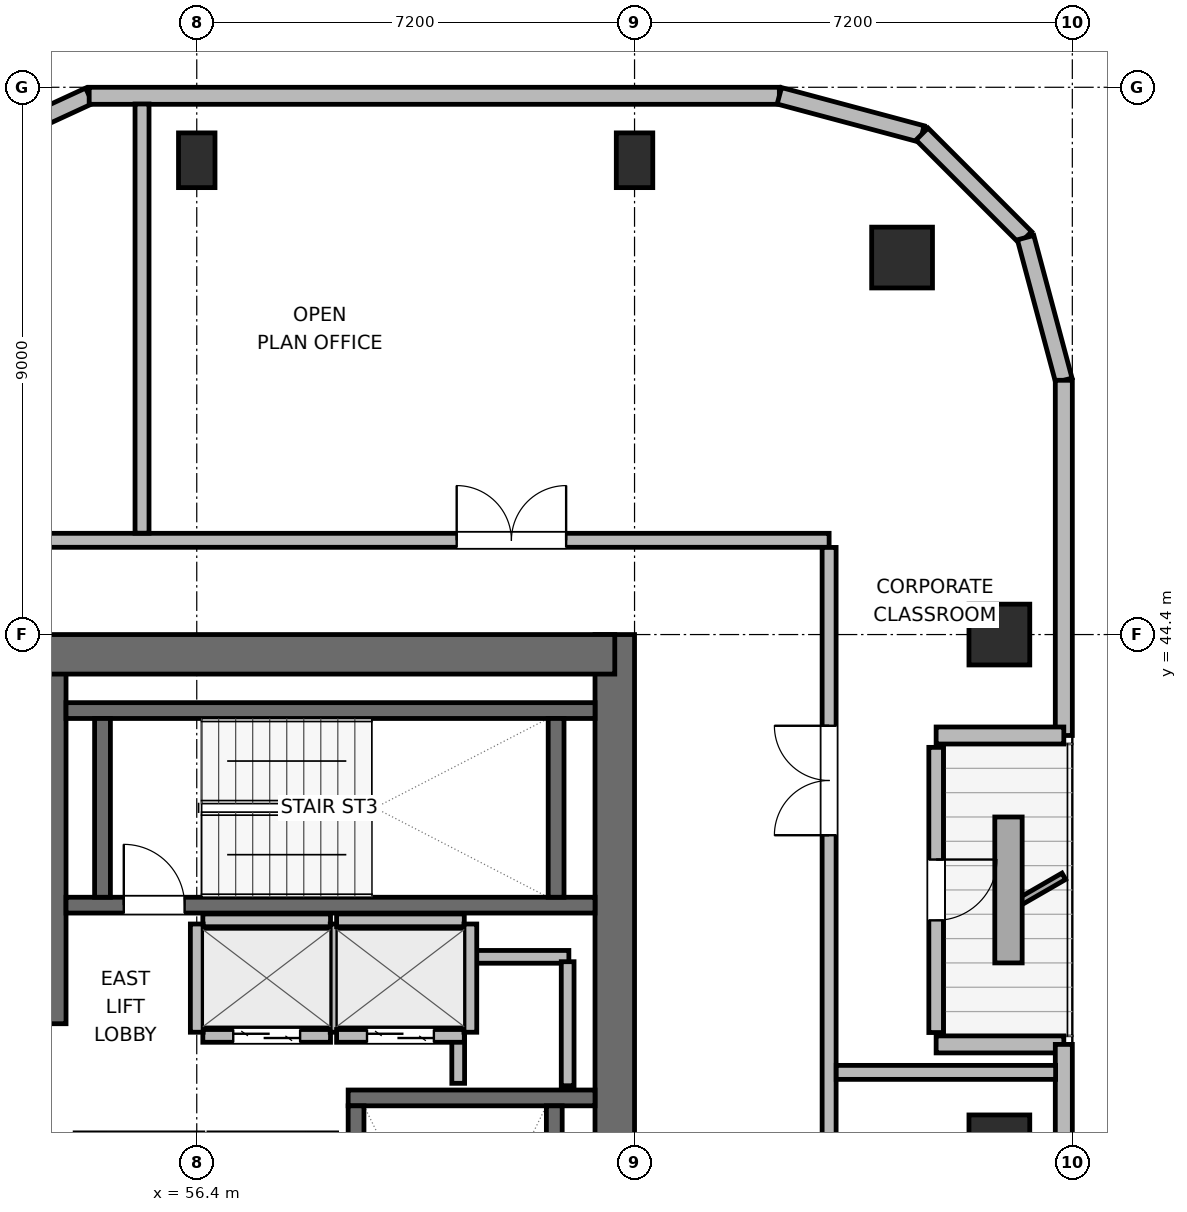
"""IFC4 building model, lengths in metres.
Left out: names, types, materials, properties, quantities, classifications, styles, units other than length and angle.
Written with IfcOpenShell. Run it as: python <this file> out.ifc"""

import sys

from ifc_helpers import new_model, si_unit, direction, frame, frame_2d, origin, origin_2d, place, context, subcontext, project, spatial, rectangle, circle, extrude, element, fill, save


model = new_model("IFC4")
c1 = context("Model", 3, precision=1e-05, world=origin(), true_north=direction((0.0, 1.0)))
c2 = subcontext(c1, "Body", "Model", "MODEL_VIEW")
j1 = project(units=[si_unit("LENGTHUNIT", "METRE"), si_unit("PLANEANGLEUNIT", "RADIAN")], contexts=[c1])
p1 = place(None, origin())
s1 = spatial("IfcSite", under=j1, at=p1, CompositionType="ELEMENT")
p2 = place(p1, origin())
s2 = spatial("IfcBuilding", under=s1, at=p2, CompositionType="ELEMENT")
p3 = place(p2, frame((0.0, 0.0, 255.0)))
s3 = spatial("IfcBuildingStorey", under=s2, at=p3, CompositionType="ELEMENT", Elevation=255.0)
p4 = place(p3, frame((53.925, 38.0, 0.0), z_axis=(0.0, 0.0, 1.0), x_axis=(0.0, 1.0, 0.0)))
e1 = element("IfcWall", 1, at=p4, inside=s3, PredefinedType="SHEAR", context=c2, shape_type="SweptSolid", body=[
    extrude(rectangle(XDim=6.075, YDim=0.65, at=frame_2d((3.038, 0.0))), origin(), (0.0, 0.0, 1.0), 3.9),
])
p5 = place(p3, frame((63.275, 27.6, 0.0), z_axis=(0.0, 0.0, 1.0), x_axis=(0.0, 1.0, 0.0)))
e2 = element("IfcWall", 2, at=p5, inside=s3, PredefinedType="SHEAR", context=c2, shape_type="SweptSolid", body=[
    extrude(rectangle(XDim=16.8, YDim=0.65, at=frame_2d((8.4, 0.0))), origin(), (0.0, 0.0, 1.0), 3.9),
])
p6 = place(p3, frame((53.925, 44.075, 0.0), z_axis=(0.0, 0.0, 1.0), x_axis=(1.0, 0.0, 0.0)))
e3 = element("IfcWall", 3, at=p6, inside=s3, PredefinedType="SHEAR", context=c2, shape_type="SweptSolid", body=[
    extrude(rectangle(XDim=9.35, YDim=0.65, at=frame_2d((4.675, 0.0))), origin(), (0.0, 0.0, 1.0), 3.9),
])
p7 = place(p3, frame((58.89, 36.78, 0.0), z_axis=(0.0, 0.0, 1.0), x_axis=(1.0, 0.0, 0.0)))
e4 = element("IfcWall", 4, at=p7, inside=s3, PredefinedType="SHEAR", context=c2, shape_type="SweptSolid", body=[
    extrude(rectangle(XDim=4.06, YDim=0.26, at=frame_2d((2.03, 0.0))), origin(), (0.0, 0.0, 1.0), 3.9),
])
p8 = place(p3, frame((59.02, 29.05, 0.0), z_axis=(0.0, 0.0, 1.0), x_axis=(0.0, 1.0, 0.0)))
e5 = element("IfcWall", 5, at=p8, inside=s3, PredefinedType="SHEAR", context=c2, shape_type="SweptSolid", body=[
    extrude(rectangle(XDim=7.6, YDim=0.26, at=frame_2d((3.8, 0.0))), origin(), (0.0, 0.0, 1.0), 3.9),
])
p9 = place(p8, frame((0.3, 0.0, 0.0)))
e6 = element("IfcOpeningElement", 6, at=p9, cuts=e5, PredefinedType="OPENING", context=c2, shape_type="SweptSolid", body=[
    extrude(rectangle(XDim=1.0, YDim=2.04, at=frame_2d((0.5, 1.02))), frame((0.0, 0.14, 0.0), z_axis=(0.0, -1.0, 0.0), x_axis=(1.0, 0.0, 0.0)), (0.0, 0.0, 1.0), 0.28),
])
p10 = place(p3, frame((62.28, 29.05, 0.0), z_axis=(0.0, 0.0, 1.0), x_axis=(0.0, 1.0, 0.0)))
e7 = element("IfcWall", 7, at=p10, inside=s3, PredefinedType="SHEAR", context=c2, shape_type="SweptSolid", body=[
    extrude(rectangle(XDim=7.6, YDim=0.26, at=frame_2d((3.8, 0.0))), origin(), (0.0, 0.0, 1.0), 3.9),
])
p11 = place(p3, frame((54.25, 39.95, 0.0), z_axis=(0.0, 0.0, 1.0), x_axis=(1.0, 0.0, 0.0)))
e8 = element("IfcWall", 8, at=p11, inside=s3, PredefinedType="SHEAR", context=c2, shape_type="SweptSolid", body=[
    extrude(rectangle(XDim=8.7, YDim=0.26, at=frame_2d((4.35, 0.0))), origin(), (0.0, 0.0, 1.0), 3.9),
])
p12 = place(p11, frame((0.95, 0.0, 0.0)))
e9 = element("IfcOpeningElement", 9, at=p12, cuts=e8, PredefinedType="OPENING", context=c2, shape_type="SweptSolid", body=[
    extrude(rectangle(XDim=1.0, YDim=2.04, at=frame_2d((0.5, 1.02))), frame((0.0, 0.14, 0.0), z_axis=(0.0, -1.0, 0.0), x_axis=(1.0, 0.0, 0.0)), (0.0, 0.0, 1.0), 0.28),
])
p13 = place(p3, frame((54.25, 43.15, 0.0), z_axis=(0.0, 0.0, 1.0), x_axis=(1.0, 0.0, 0.0)))
e10 = element("IfcWall", 10, at=p13, inside=s3, PredefinedType="SHEAR", context=c2, shape_type="SweptSolid", body=[
    extrude(rectangle(XDim=8.7, YDim=0.26, at=frame_2d((4.35, 0.0))), origin(), (0.0, 0.0, 1.0), 3.9),
])
for number, where, z_axis, x_axis in (
    (11, (54.85, 40.08, 0.0), (0.0, 0.0, 1.0), (0.0, 1.0, 0.0)),
    (12, (62.31, 40.08, 0.0), (0.0, 0.0, 1.0), (0.0, 1.0, 0.0)),
):
    element("IfcWall", number, at=place(p3, frame(where, z_axis=z_axis, x_axis=x_axis)), inside=s3, PredefinedType="SHEAR", context=c2, shape_type="SweptSolid", body=[
        extrude(rectangle(XDim=2.94, YDim=0.26, at=frame_2d((1.47, 0.0))), origin(), (0.0, 0.0, 1.0), 3.9),
    ])
p14 = place(p3, frame((68.0, 50.6, 0.0), z_axis=(0.0, 0.0, 1.0), x_axis=(1.0, 0.0, 0.0)))
e13 = element("IfcColumn", 13, at=p14, inside=s3, PredefinedType="COLUMN", context=c2, shape_type="SweptSolid", body=[
    extrude(circle(Radius=0.5, at=origin_2d()), origin(), (0.0, 0.0, 1.0), 3.9),
])
for number, where, z_axis, x_axis in (
    (14, (56.4, 52.2, 0.0), (0.0, 0.0, 1.0), (1.0, 0.0, 0.0)),
    (15, (63.6, 52.2, 0.0), (0.0, 0.0, 1.0), (1.0, 0.0, 0.0)),
):
    element("IfcColumn", number, at=place(p3, frame(where, z_axis=z_axis, x_axis=x_axis)), inside=s3, PredefinedType="COLUMN", context=c2, shape_type="SweptSolid", body=[
        extrude(rectangle(XDim=0.6, YDim=0.9, at=origin_2d()), origin(), (0.0, 0.0, 1.0), 3.9),
    ])
for number, where, z_axis, x_axis in (
    (16, (69.6, 36.0, 0.0), (0.0, 0.0, 1.0), (1.0, 0.0, 0.0)),
    (17, (69.6, 44.4, 0.0), (0.0, 0.0, 1.0), (1.0, 0.0, 0.0)),
):
    element("IfcColumn", number, at=place(p3, frame(where, z_axis=z_axis, x_axis=x_axis)), inside=s3, PredefinedType="COLUMN", context=c2, shape_type="SweptSolid", body=[
        extrude(rectangle(XDim=1.0, YDim=1.0, at=origin_2d()), origin(), (0.0, 0.0, 1.0), 3.9),
    ])
p15 = place(p3, frame((53.54, 52.756, 0.0), z_axis=(0.0, 0.0, 1.0), x_axis=(0.907893953211, 0.419199916176, 0.0)))
e18 = element("IfcWall", 18, at=p15, inside=s3, PredefinedType="SOLIDWALL", context=c2, shape_type="SweptSolid", body=[
    extrude(rectangle(XDim=1.201, YDim=0.28, at=frame_2d((0.601, 0.0))), origin(), (0.0, 0.0, 1.0), 3.68),
])
p16 = place(p3, frame((54.631, 53.26, 0.0), z_axis=(0.0, 0.0, 1.0), x_axis=(1.0, 0.0, 0.0)))
e19 = element("IfcWall", 19, at=p16, inside=s3, PredefinedType="SOLIDWALL", context=c2, shape_type="SweptSolid", body=[
    extrude(rectangle(XDim=11.351, YDim=0.28, at=frame_2d((5.675, 0.0))), origin(), (0.0, 0.0, 1.0), 3.68),
])
p17 = place(p3, frame((65.982, 53.26, 0.0), z_axis=(0.0, 0.0, 1.0), x_axis=(0.965937282298, -0.25877628691, 0.0)))
e20 = element("IfcWall", 20, at=p17, inside=s3, PredefinedType="SOLIDWALL", context=c2, shape_type="SweptSolid", body=[
    extrude(rectangle(XDim=2.428, YDim=0.28, at=frame_2d((1.214, 0.0))), origin(), (0.0, 0.0, 1.0), 3.68),
])
p18 = place(p3, frame((68.327, 52.632, 0.0), z_axis=(0.0, 0.0, 1.0), x_axis=(0.707106781187, -0.707106781187, 0.0)))
e21 = element("IfcWall", 21, at=p18, inside=s3, PredefinedType="SOLIDWALL", context=c2, shape_type="SweptSolid", body=[
    extrude(rectangle(XDim=2.41, YDim=0.28, at=frame_2d((1.205, 0.0))), origin(), (0.0, 0.0, 1.0), 3.68),
])
p19 = place(p3, frame((70.031, 50.927, 0.0), z_axis=(0.0, 0.0, 1.0), x_axis=(0.258751159445, -0.965944013639, 0.0)))
e22 = element("IfcWall", 22, at=p19, inside=s3, PredefinedType="SOLIDWALL", context=c2, shape_type="SweptSolid", body=[
    extrude(rectangle(XDim=2.429, YDim=0.28, at=frame_2d((1.214, 0.0))), origin(), (0.0, 0.0, 1.0), 3.68),
])
p20 = place(p3, frame((70.66, 48.582, 0.0), z_axis=(0.0, 0.0, 1.0), x_axis=(0.0, -1.0, 0.0)))
e23 = element("IfcWall", 23, at=p20, inside=s3, PredefinedType="SOLIDWALL", context=c2, shape_type="SweptSolid", body=[
    extrude(rectangle(XDim=5.842, YDim=0.28, at=frame_2d((2.921, 0.0))), origin(), (0.0, 0.0, 1.0), 3.68),
])
p21 = place(p3, frame((70.66, 42.74, 0.0), z_axis=(0.0, 0.0, 1.0), x_axis=(-1.0, 0.0, 0.0)))
e24 = element("IfcWall", 24, at=p21, inside=s3, PredefinedType="SOLIDWALL", context=c2, shape_type="SweptSolid", body=[
    extrude(rectangle(XDim=2.1, YDim=0.28, at=frame_2d((1.05, 0.0))), origin(), (0.0, 0.0, 1.0), 3.126),
])
p22 = place(p3, frame((68.56, 42.545, 0.0), z_axis=(0.0, 0.0, 1.0), x_axis=(0.0, -1.0, 0.0)))
e25 = element("IfcWall", 25, at=p22, inside=s3, PredefinedType="SOLIDWALL", context=c2, shape_type="SweptSolid", body=[
    extrude(rectangle(XDim=4.69, YDim=0.24, at=frame_2d((2.345, 0.0))), origin(), (0.0, 0.0, 1.0), 3.311),
])
p23 = place(p22, frame((1.845, 0.0, 0.0)))
e26 = element("IfcOpeningElement", 26, at=p23, cuts=e25, PredefinedType="OPENING", context=c2, shape_type="SweptSolid", body=[
    extrude(rectangle(XDim=1.0, YDim=2.02, at=frame_2d((0.5, 1.01))), frame((0.0, 0.13, 0.0), z_axis=(0.0, -1.0, 0.0), x_axis=(1.0, 0.0, 0.0)), (0.0, 0.0, 1.0), 0.26),
])
p24 = place(p3, frame((68.56, 37.66, 0.0), z_axis=(0.0, 0.0, 1.0), x_axis=(1.0, 0.0, 0.0)))
e27 = element("IfcWall", 27, at=p24, inside=s3, PredefinedType="SOLIDWALL", context=c2, shape_type="SweptSolid", body=[
    extrude(rectangle(XDim=2.1, YDim=0.28, at=frame_2d((1.05, 0.0))), origin(), (0.0, 0.0, 1.0), 3.126),
])
p25 = place(p3, frame((70.66, 37.66, 0.0), z_axis=(0.0, 0.0, 1.0), x_axis=(0.0, -1.0, 0.0)))
e28 = element("IfcWall", 28, at=p25, inside=s3, PredefinedType="SOLIDWALL", context=c2, shape_type="SweptSolid", body=[
    extrude(rectangle(XDim=14.241, YDim=0.28, at=frame_2d((7.121, 0.0))), origin(), (0.0, 0.0, 1.0), 3.68),
])
p26 = place(p25, frame((6.456, 0.0, 0.85)))
e29 = element("IfcOpeningElement", 29, at=p26, cuts=e28, PredefinedType="OPENING", context=c2, shape_type="SweptSolid", body=[
    extrude(rectangle(XDim=1.6, YDim=1.0, at=frame_2d((0.8, 0.5))), frame((0.0, 0.15, 0.0), z_axis=(0.0, -1.0, 0.0), x_axis=(1.0, 0.0, 0.0)), (0.0, 0.0, 1.0), 0.3),
])
p27 = place(p3, frame((60.72, 39.1, 0.0), z_axis=(0.0, 0.0, 1.0), x_axis=(1.0, 0.0, 0.0)))
e30 = element("IfcWall", 30, at=p27, inside=s3, PredefinedType="PARTITIONING", context=c2, shape_type="SweptSolid", body=[
    extrude(rectangle(XDim=1.8, YDim=0.21, at=frame_2d((0.9, 0.0))), origin(), (0.0, 0.0, 1.0), 3.68),
])
p28 = place(p3, frame((60.7, 37.02, 0.0), z_axis=(0.0, 0.0, 1.0), x_axis=(0.0, 1.0, 0.0)))
e31 = element("IfcWall", 31, at=p28, inside=s3, PredefinedType="PARTITIONING", context=c2, shape_type="SweptSolid", body=[
    extrude(rectangle(XDim=1.96, YDim=0.21, at=frame_2d((0.98, 0.0))), origin(), (0.0, 0.0, 1.0), 3.68),
])
p29 = place(p3, frame((62.5, 36.98, 0.0), z_axis=(0.0, 0.0, 1.0), x_axis=(0.0, 1.0, 0.0)))
e32 = element("IfcWall", 32, at=p29, inside=s3, PredefinedType="PARTITIONING", context=c2, shape_type="SweptSolid", body=[
    extrude(rectangle(XDim=2.04, YDim=0.21, at=frame_2d((1.02, 0.0))), origin(), (0.0, 0.0, 1.0), 3.68),
])
p30 = place(p3, frame((56.5, 37.8, 0.0), z_axis=(0.0, 0.0, 1.0), x_axis=(1.0, 0.0, 0.0)))
e33 = element("IfcWall", 33, at=p30, inside=s3, PredefinedType="PARTITIONING", context=c2, shape_type="SweptSolid", body=[
    extrude(rectangle(XDim=2.1, YDim=0.21, at=frame_2d((1.05, 0.0))), origin(), (0.0, 0.0, 1.0), 3.68),
])
p31 = place(p30, frame((0.5, 0.0, 0.0)))
e34 = element("IfcOpeningElement", 34, at=p31, cuts=e33, PredefinedType="OPENING", context=c2, shape_type="SweptSolid", body=[
    extrude(rectangle(XDim=1.1, YDim=2.04, at=frame_2d((0.55, 1.02))), frame((0.0, 0.115, 0.0), z_axis=(0.0, -1.0, 0.0), x_axis=(1.0, 0.0, 0.0)), (0.0, 0.0, 1.0), 0.23),
])
p32 = place(p3, frame((56.5, 39.7, 0.0), z_axis=(0.0, 0.0, 1.0), x_axis=(1.0, 0.0, 0.0)))
e35 = element("IfcWall", 35, at=p32, inside=s3, PredefinedType="PARTITIONING", context=c2, shape_type="SweptSolid", body=[
    extrude(rectangle(XDim=2.1, YDim=0.21, at=frame_2d((1.05, 0.0))), origin(), (0.0, 0.0, 1.0), 3.68),
])
for number, where, z_axis, x_axis in (
    (36, (56.4, 37.86, 0.0), (0.0, 0.0, 1.0), (0.0, 1.0, 0.0)),
    (37, (58.7, 37.86, 0.0), (0.0, 0.0, 1.0), (0.0, 1.0, 0.0)),
):
    element("IfcWall", number, at=place(p3, frame(where, z_axis=z_axis, x_axis=x_axis)), inside=s3, PredefinedType="PARTITIONING", context=c2, shape_type="SweptSolid", body=[
        extrude(rectangle(XDim=1.78, YDim=0.21, at=frame_2d((0.89, 0.0))), origin(), (0.0, 0.0, 1.0), 3.68),
    ])
p33 = place(p3, frame((58.7, 37.8, 0.0), z_axis=(0.0, 0.0, 1.0), x_axis=(1.0, 0.0, 0.0)))
e38 = element("IfcWall", 38, at=p33, inside=s3, PredefinedType="PARTITIONING", context=c2, shape_type="SweptSolid", body=[
    extrude(rectangle(XDim=2.1, YDim=0.21, at=frame_2d((1.05, 0.0))), origin(), (0.0, 0.0, 1.0), 3.68),
])
p34 = place(p33, frame((0.5, 0.0, 0.0)))
e39 = element("IfcOpeningElement", 39, at=p34, cuts=e38, PredefinedType="OPENING", context=c2, shape_type="SweptSolid", body=[
    extrude(rectangle(XDim=1.1, YDim=2.04, at=frame_2d((0.55, 1.02))), frame((0.0, 0.115, 0.0), z_axis=(0.0, -1.0, 0.0), x_axis=(1.0, 0.0, 0.0)), (0.0, 0.0, 1.0), 0.23),
])
p35 = place(p3, frame((58.7, 39.7, 0.0), z_axis=(0.0, 0.0, 1.0), x_axis=(1.0, 0.0, 0.0)))
e40 = element("IfcWall", 40, at=p35, inside=s3, PredefinedType="PARTITIONING", context=c2, shape_type="SweptSolid", body=[
    extrude(rectangle(XDim=2.1, YDim=0.21, at=frame_2d((1.05, 0.0))), origin(), (0.0, 0.0, 1.0), 3.68),
])
p36 = place(p3, frame((60.9, 37.86, 0.0), z_axis=(0.0, 0.0, 1.0), x_axis=(0.0, 1.0, 0.0)))
e41 = element("IfcWall", 41, at=p36, inside=s3, PredefinedType="PARTITIONING", context=c2, shape_type="SweptSolid", body=[
    extrude(rectangle(XDim=1.78, YDim=0.21, at=frame_2d((0.89, 0.0))), origin(), (0.0, 0.0, 1.0), 3.68),
])
p37 = place(p3, frame((30.8, 45.95, 0.0), z_axis=(0.0, 0.0, 1.0), x_axis=(1.0, 0.0, 0.0)))
e42 = element("IfcWall", 42, at=p37, inside=s3, PredefinedType="PARTITIONING", context=c2, shape_type="SweptSolid", body=[
    extrude(rectangle(XDim=36.0, YDim=0.23, at=frame_2d((18.0, 0.0))), origin(), (0.0, 0.0, 1.0), 3.68),
])
p38 = place(p37, frame((3.875, 0.0, 0.0)))
e43 = element("IfcOpeningElement", 43, at=p38, cuts=e42, PredefinedType="OPENING", context=c2, shape_type="SweptSolid", body=[
    extrude(rectangle(XDim=1.8, YDim=2.06, at=frame_2d((0.9, 1.03))), frame((0.0, 0.125, 0.0), z_axis=(0.0, -1.0, 0.0), x_axis=(1.0, 0.0, 0.0)), (0.0, 0.0, 1.0), 0.25),
])
p39 = place(p37, frame((16.225, 0.0, 0.0)))
e44 = element("IfcOpeningElement", 44, at=p39, cuts=e42, PredefinedType="OPENING", context=c2, shape_type="SweptSolid", body=[
    extrude(rectangle(XDim=1.8, YDim=2.06, at=frame_2d((0.9, 1.03))), frame((0.0, 0.125, 0.0), z_axis=(0.0, -1.0, 0.0), x_axis=(1.0, 0.0, 0.0)), (0.0, 0.0, 1.0), 0.25),
])
p40 = place(p37, frame((29.875, 0.0, 0.0)))
e45 = element("IfcOpeningElement", 45, at=p40, cuts=e42, PredefinedType="OPENING", context=c2, shape_type="SweptSolid", body=[
    extrude(rectangle(XDim=1.8, YDim=2.06, at=frame_2d((0.9, 1.03))), frame((0.0, 0.125, 0.0), z_axis=(0.0, -1.0, 0.0), x_axis=(1.0, 0.0, 0.0)), (0.0, 0.0, 1.0), 0.25),
])
p41 = place(p3, frame((66.8, 26.167, 0.0), z_axis=(0.0, 0.0, 1.0), x_axis=(0.0, 1.0, 0.0)))
e46 = element("IfcWall", 46, at=p41, inside=s3, PredefinedType="PARTITIONING", context=c2, shape_type="SweptSolid", body=[
    extrude(rectangle(XDim=19.666, YDim=0.23, at=frame_2d((9.833, 0.0))), origin(), (0.0, 0.0, 1.0), 3.68),
])
p42 = place(p41, frame((4.983, 0.0, 0.0)))
e47 = element("IfcOpeningElement", 47, at=p42, cuts=e46, PredefinedType="OPENING", context=c2, shape_type="SweptSolid", body=[
    extrude(rectangle(XDim=1.8, YDim=2.06, at=frame_2d((0.9, 1.03))), frame((0.0, 0.125, 0.0), z_axis=(0.0, -1.0, 0.0), x_axis=(1.0, 0.0, 0.0)), (0.0, 0.0, 1.0), 0.25),
])
p43 = place(p41, frame((14.933, 0.0, 0.0)))
e48 = element("IfcOpeningElement", 48, at=p43, cuts=e46, PredefinedType="OPENING", context=c2, shape_type="SweptSolid", body=[
    extrude(rectangle(XDim=1.8, YDim=2.06, at=frame_2d((0.9, 1.03))), frame((0.0, 0.125, 0.0), z_axis=(0.0, -1.0, 0.0), x_axis=(1.0, 0.0, 0.0)), (0.0, 0.0, 1.0), 0.25),
])
p44 = place(p3, frame((55.5, 46.067, 0.0), z_axis=(0.0, 0.0, 1.0), x_axis=(0.0, 1.0, 0.0)))
e49 = element("IfcWall", 49, at=p44, inside=s3, PredefinedType="PARTITIONING", context=c2, shape_type="SweptSolid", body=[
    extrude(rectangle(XDim=7.058, YDim=0.23, at=frame_2d((3.529, 0.0))), origin(), (0.0, 0.0, 1.0), 3.043),
])
p45 = place(p3, frame((66.917, 37.2, 0.0), z_axis=(0.0, 0.0, 1.0), x_axis=(1.0, 0.0, 0.0)))
e50 = element("IfcWall", 50, at=p45, inside=s3, PredefinedType="PARTITIONING", context=c2, shape_type="SweptSolid", body=[
    extrude(rectangle(XDim=3.608, YDim=0.23, at=frame_2d((1.804, 0.0))), origin(), (0.0, 0.0, 1.0), 3.68),
])
p46 = place(p23, origin())
e51 = element("IfcDoor", 51, at=p46, inside=s3, OperationType="SINGLE_SWING_LEFT", PredefinedType="DOOR", context=c2, shape_type="SweptSolid", body=[
    extrude(rectangle(XDim=1.0, YDim=2.02, at=frame_2d((0.5, 1.01))), frame((0.0, 0.025, 0.0), z_axis=(0.0, -1.0, 0.0), x_axis=(1.0, 0.0, 0.0)), (0.0, 0.0, 1.0), 0.05),
])
fill(e26, e51)
p47 = place(p12, origin())
e52 = element("IfcDoor", 52, at=p47, inside=s3, OperationType="SINGLE_SWING_LEFT", PredefinedType="DOOR", context=c2, shape_type="SweptSolid", body=[
    extrude(rectangle(XDim=1.0, YDim=2.04, at=frame_2d((0.5, 1.02))), frame((0.0, 0.025, 0.0), z_axis=(0.0, -1.0, 0.0), x_axis=(1.0, 0.0, 0.0)), (0.0, 0.0, 1.0), 0.05),
])
fill(e9, e52)
p48 = place(p31, origin())
e53 = element("IfcDoor", 53, at=p48, inside=s3, OperationType="DOUBLE_DOOR_SLIDING", PredefinedType="DOOR", context=c2, shape_type="SweptSolid", body=[
    extrude(rectangle(XDim=1.1, YDim=2.04, at=frame_2d((0.55, 1.02))), frame((0.0, 0.025, 0.0), z_axis=(0.0, -1.0, 0.0), x_axis=(1.0, 0.0, 0.0)), (0.0, 0.0, 1.0), 0.05),
])
fill(e34, e53)
p49 = place(p34, origin())
e54 = element("IfcDoor", 54, at=p49, inside=s3, OperationType="DOUBLE_DOOR_SLIDING", PredefinedType="DOOR", context=c2, shape_type="SweptSolid", body=[
    extrude(rectangle(XDim=1.1, YDim=2.04, at=frame_2d((0.55, 1.02))), frame((0.0, 0.025, 0.0), z_axis=(0.0, -1.0, 0.0), x_axis=(1.0, 0.0, 0.0)), (0.0, 0.0, 1.0), 0.05),
])
fill(e39, e54)
p50 = place(p40, origin())
e55 = element("IfcDoor", 55, at=p50, inside=s3, OperationType="DOUBLE_DOOR_SINGLE_SWING", PredefinedType="DOOR", context=c2, shape_type="SweptSolid", body=[
    extrude(rectangle(XDim=1.8, YDim=2.06, at=frame_2d((0.9, 1.03))), frame((0.0, 0.025, 0.0), z_axis=(0.0, -1.0, 0.0), x_axis=(1.0, 0.0, 0.0)), (0.0, 0.0, 1.0), 0.05),
])
fill(e45, e55)
p51 = place(p43, origin())
e56 = element("IfcDoor", 56, at=p51, inside=s3, OperationType="DOUBLE_DOOR_SINGLE_SWING", PredefinedType="DOOR", context=c2, shape_type="SweptSolid", body=[
    extrude(rectangle(XDim=1.8, YDim=2.06, at=frame_2d((0.9, 1.03))), frame((0.0, 0.025, 0.0), z_axis=(0.0, -1.0, 0.0), x_axis=(1.0, 0.0, 0.0)), (0.0, 0.0, 1.0), 0.05),
])
fill(e48, e56)
save(model, sys.argv[1])
